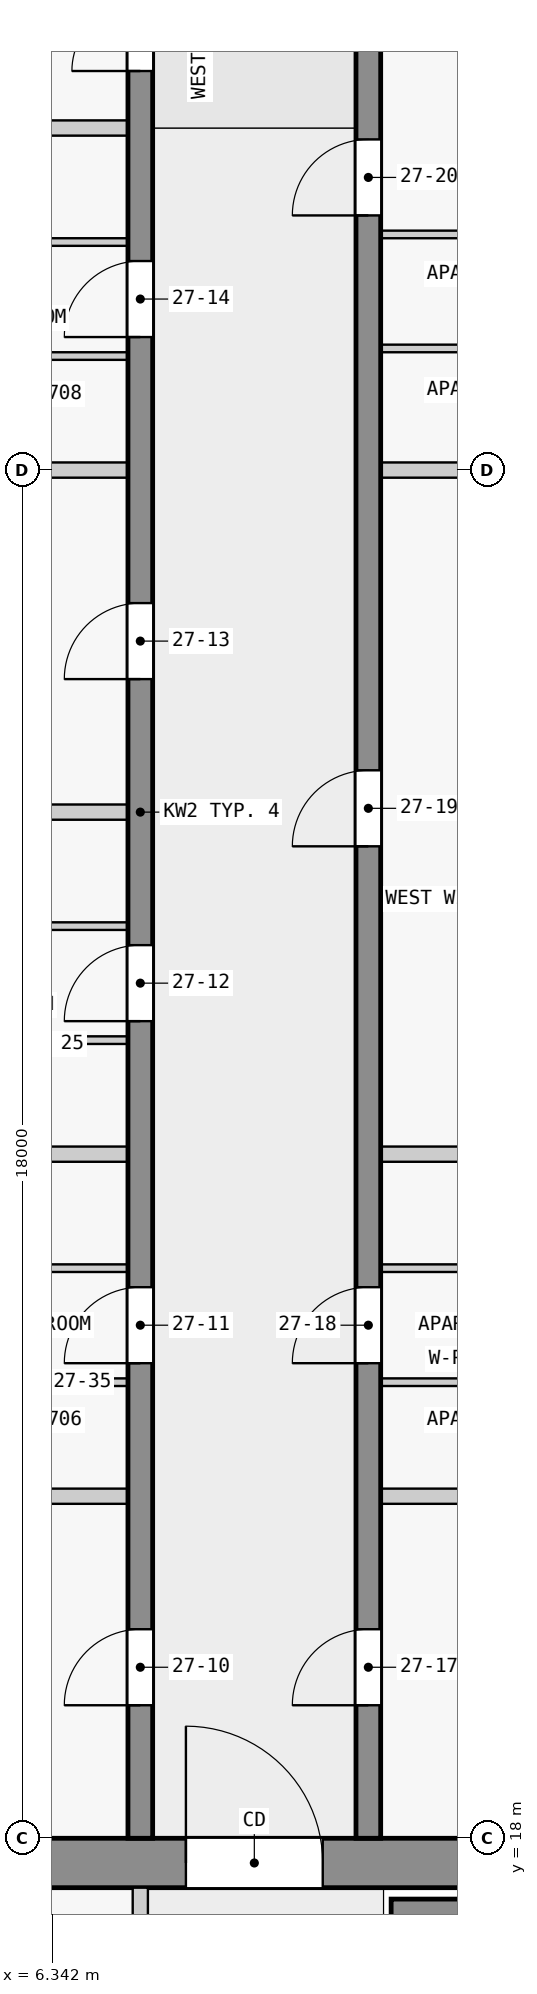
"""IFC4 building model, lengths in metres.
Left out: names, types, materials, properties, quantities, classifications, styles, units other than length and angle.
Written with IfcOpenShell. Run it as: python <this file> out.ifc"""

import sys

from ifc_helpers import new_model, si_unit, direction, frame, frame_2d, origin, place, context, subcontext, project, spatial, rectangle, extrude, element, fill, save


model = new_model("IFC4")
c1 = context("Model", 3, precision=1e-05, world=origin(), true_north=direction((0.0, 1.0)))
c2 = subcontext(c1, "Body", "Model", "MODEL_VIEW")
j1 = project(units=[si_unit("LENGTHUNIT", "METRE"), si_unit("PLANEANGLEUNIT", "RADIAN")], contexts=[c1])
p1 = place(None, origin())
s1 = spatial("IfcSite", under=j1, at=p1, CompositionType="ELEMENT")
p2 = place(p1, origin())
s2 = spatial("IfcBuilding", under=s1, at=p2, CompositionType="ELEMENT")
p3 = place(p2, frame((0.0, 0.0, 106.3)))
s3 = spatial("IfcBuildingStorey", under=s2, at=p3, CompositionType="ELEMENT", Elevation=106.3)
p4 = place(p3, frame((1.65, 17.675, 0.0), z_axis=(0.0, 0.0, 1.0), x_axis=(1.0, 0.0, 0.0)))
e1 = element("IfcWall", 1, at=p4, inside=s3, PredefinedType="SHEAR", context=c2, shape_type="SweptSolid", body=[
    extrude(rectangle(XDim=20.85, YDim=0.65, at=frame_2d((10.425, 0.0))), origin(), (0.0, 0.0, 1.0), 3.25),
])
p5 = place(p4, frame((6.45, 0.0, 0.0)))
e2 = element("IfcOpeningElement", 2, at=p5, cuts=e1, PredefinedType="OPENING", context=c2, shape_type="SweptSolid", body=[
    extrude(rectangle(XDim=1.8, YDim=2.1, at=frame_2d((0.9, 1.05))), frame((0.0, 0.335, 0.0), z_axis=(0.0, -1.0, 0.0), x_axis=(1.0, 0.0, 0.0)), (0.0, 0.0, 1.0), 0.67),
])
p6 = place(p3, frame((10.8, 17.05, 0.0), z_axis=(0.0, 0.0, 1.0), x_axis=(1.0, 0.0, 0.0)))
e3 = element("IfcWall", 3, at=p6, inside=s3, PredefinedType="SHEAR", context=c2, shape_type="SweptSolid", body=[
    extrude(rectangle(XDim=7.8, YDim=0.3, at=frame_2d((3.9, 0.0))), origin(), (0.0, 0.0, 1.0), 3.25),
])
p7 = place(p3, frame((7.5, 18.0, 0.0), z_axis=(0.0, 0.0, 1.0), x_axis=(0.0, 1.0, 0.0)))
e4 = element("IfcWall", 4, at=p7, inside=s3, PredefinedType="SHEAR", context=c2, shape_type="SweptSolid", body=[
    extrude(rectangle(XDim=27.0, YDim=0.325, at=frame_2d((13.5, 0.0))), origin(), (0.0, 0.0, 1.0), 3.25),
])
p8 = place(p7, frame((1.75, 0.0, 0.0)))
e5 = element("IfcOpeningElement", 5, at=p8, cuts=e4, PredefinedType="OPENING", context=c2, shape_type="SweptSolid", body=[
    extrude(rectangle(XDim=1.0, YDim=2.1, at=frame_2d((0.5, 1.05))), frame((0.0, 0.172, 0.0), z_axis=(0.0, -1.0, 0.0), x_axis=(1.0, 0.0, 0.0)), (0.0, 0.0, 1.0), 0.345),
])
p9 = place(p7, frame((6.25, 0.0, 0.0)))
e6 = element("IfcOpeningElement", 6, at=p9, cuts=e4, PredefinedType="OPENING", context=c2, shape_type="SweptSolid", body=[
    extrude(rectangle(XDim=1.0, YDim=2.1, at=frame_2d((0.5, 1.05))), frame((0.0, 0.172, 0.0), z_axis=(0.0, -1.0, 0.0), x_axis=(1.0, 0.0, 0.0)), (0.0, 0.0, 1.0), 0.345),
])
p10 = place(p7, frame((10.75, 0.0, 0.0)))
e7 = element("IfcOpeningElement", 7, at=p10, cuts=e4, PredefinedType="OPENING", context=c2, shape_type="SweptSolid", body=[
    extrude(rectangle(XDim=1.0, YDim=2.1, at=frame_2d((0.5, 1.05))), frame((0.0, 0.172, 0.0), z_axis=(0.0, -1.0, 0.0), x_axis=(1.0, 0.0, 0.0)), (0.0, 0.0, 1.0), 0.345),
])
p11 = place(p7, frame((15.25, 0.0, 0.0)))
e8 = element("IfcOpeningElement", 8, at=p11, cuts=e4, PredefinedType="OPENING", context=c2, shape_type="SweptSolid", body=[
    extrude(rectangle(XDim=1.0, YDim=2.1, at=frame_2d((0.5, 1.05))), frame((0.0, 0.172, 0.0), z_axis=(0.0, -1.0, 0.0), x_axis=(1.0, 0.0, 0.0)), (0.0, 0.0, 1.0), 0.345),
])
p12 = place(p7, frame((19.75, 0.0, 0.0)))
e9 = element("IfcOpeningElement", 9, at=p12, cuts=e4, PredefinedType="OPENING", context=c2, shape_type="SweptSolid", body=[
    extrude(rectangle(XDim=1.0, YDim=2.1, at=frame_2d((0.5, 1.05))), frame((0.0, 0.172, 0.0), z_axis=(0.0, -1.0, 0.0), x_axis=(1.0, 0.0, 0.0)), (0.0, 0.0, 1.0), 0.345),
])
p13 = place(p7, frame((23.25, 0.0, 0.0)))
e10 = element("IfcOpeningElement", 10, at=p13, cuts=e4, PredefinedType="OPENING", context=c2, shape_type="SweptSolid", body=[
    extrude(rectangle(XDim=0.9, YDim=2.1, at=frame_2d((0.45, 1.05))), frame((0.0, 0.172, 0.0), z_axis=(0.0, -1.0, 0.0), x_axis=(1.0, 0.0, 0.0)), (0.0, 0.0, 1.0), 0.345),
])
p14 = place(p7, frame((25.45, 0.0, 0.0)))
e11 = element("IfcOpeningElement", 11, at=p14, cuts=e4, PredefinedType="OPENING", context=c2, shape_type="SweptSolid", body=[
    extrude(rectangle(XDim=1.0, YDim=2.1, at=frame_2d((0.5, 1.05))), frame((0.0, 0.172, 0.0), z_axis=(0.0, -1.0, 0.0), x_axis=(1.0, 0.0, 0.0)), (0.0, 0.0, 1.0), 0.345),
])
p15 = place(p3, frame((10.5, 18.0, 0.0), z_axis=(0.0, 0.0, 1.0), x_axis=(0.0, 1.0, 0.0)))
e12 = element("IfcWall", 12, at=p15, inside=s3, PredefinedType="SHEAR", context=c2, shape_type="SweptSolid", body=[
    extrude(rectangle(XDim=27.0, YDim=0.325, at=frame_2d((13.5, 0.0))), origin(), (0.0, 0.0, 1.0), 3.25),
])
p16 = place(p15, frame((1.75, 0.0, 0.0)))
e13 = element("IfcOpeningElement", 13, at=p16, cuts=e12, PredefinedType="OPENING", context=c2, shape_type="SweptSolid", body=[
    extrude(rectangle(XDim=1.0, YDim=2.1, at=frame_2d((0.5, 1.05))), frame((0.0, 0.172, 0.0), z_axis=(0.0, -1.0, 0.0), x_axis=(1.0, 0.0, 0.0)), (0.0, 0.0, 1.0), 0.345),
])
p17 = place(p15, frame((6.25, 0.0, 0.0)))
e14 = element("IfcOpeningElement", 14, at=p17, cuts=e12, PredefinedType="OPENING", context=c2, shape_type="SweptSolid", body=[
    extrude(rectangle(XDim=1.0, YDim=2.1, at=frame_2d((0.5, 1.05))), frame((0.0, 0.172, 0.0), z_axis=(0.0, -1.0, 0.0), x_axis=(1.0, 0.0, 0.0)), (0.0, 0.0, 1.0), 0.345),
])
p18 = place(p15, frame((13.05, 0.0, 0.0)))
e15 = element("IfcOpeningElement", 15, at=p18, cuts=e12, PredefinedType="OPENING", context=c2, shape_type="SweptSolid", body=[
    extrude(rectangle(XDim=1.0, YDim=2.1, at=frame_2d((0.5, 1.05))), frame((0.0, 0.172, 0.0), z_axis=(0.0, -1.0, 0.0), x_axis=(1.0, 0.0, 0.0)), (0.0, 0.0, 1.0), 0.345),
])
p19 = place(p15, frame((21.35, 0.0, 0.0)))
e16 = element("IfcOpeningElement", 16, at=p19, cuts=e12, PredefinedType="OPENING", context=c2, shape_type="SweptSolid", body=[
    extrude(rectangle(XDim=1.0, YDim=2.1, at=frame_2d((0.5, 1.05))), frame((0.0, 0.172, 0.0), z_axis=(0.0, -1.0, 0.0), x_axis=(1.0, 0.0, 0.0)), (0.0, 0.0, 1.0), 0.345),
])
p20 = place(p3, frame((7.5, 10.1, 0.0), z_axis=(0.0, 0.0, 1.0), x_axis=(0.0, 1.0, 0.0)))
e17 = element("IfcWall", 17, at=p20, inside=s3, PredefinedType="PARTITIONING", context=c2, shape_type="SweptSolid", body=[
    extrude(rectangle(XDim=7.25, YDim=0.2, at=frame_2d((3.625, 0.0))), origin(), (0.0, 0.0, 1.0), 3.25),
])
p21 = place(p20, frame((0.775, 0.0, 0.0)))
e18 = element("IfcOpeningElement", 18, at=p21, cuts=e17, PredefinedType="OPENING", context=c2, shape_type="SweptSolid", body=[
    extrude(rectangle(XDim=0.9, YDim=2.1, at=frame_2d((0.45, 1.05))), frame((0.0, 0.11, 0.0), z_axis=(0.0, -1.0, 0.0), x_axis=(1.0, 0.0, 0.0)), (0.0, 0.0, 1.0), 0.22),
])
p22 = place(p20, frame((3.225, 0.0, 0.0)))
e19 = element("IfcOpeningElement", 19, at=p22, cuts=e17, PredefinedType="OPENING", context=c2, shape_type="SweptSolid", body=[
    extrude(rectangle(XDim=0.9, YDim=2.1, at=frame_2d((0.45, 1.05))), frame((0.0, 0.11, 0.0), z_axis=(0.0, -1.0, 0.0), x_axis=(1.0, 0.0, 0.0)), (0.0, 0.0, 1.0), 0.22),
])
p23 = place(p20, frame((5.25, 0.0, 0.0)))
e20 = element("IfcOpeningElement", 20, at=p23, cuts=e17, PredefinedType="OPENING", context=c2, shape_type="SweptSolid", body=[
    extrude(rectangle(XDim=0.9, YDim=2.1, at=frame_2d((0.45, 1.05))), frame((0.0, 0.11, 0.0), z_axis=(0.0, -1.0, 0.0), x_axis=(1.0, 0.0, 0.0)), (0.0, 0.0, 1.0), 0.22),
])
for number, where, z_axis, x_axis in (
    (21, (7.337, 22.5, 0.0), (0.0, 0.0, 1.0), (-1.0, 0.0, 0.0)),
    (22, (17.85, 22.5, 0.0), (0.0, 0.0, 1.0), (-1.0, 0.0, 0.0)),
):
    element("IfcWall", number, at=place(p3, frame(where, z_axis=z_axis, x_axis=x_axis)), inside=s3, PredefinedType="PARTITIONING", context=c2, shape_type="SweptSolid", body=[
        extrude(rectangle(XDim=7.188, YDim=0.2, at=frame_2d((3.594, 0.0))), origin(), (0.0, 0.0, 1.0), 3.25),
    ])
p24 = place(p3, frame((7.337, 24.0, 0.0), z_axis=(0.0, 0.0, 1.0), x_axis=(-1.0, 0.0, 0.0)))
e23 = element("IfcWall", 23, at=p24, inside=s3, PredefinedType="PARTITIONING", context=c2, shape_type="SweptSolid", body=[
    extrude(rectangle(XDim=3.4, YDim=0.1, at=frame_2d((1.7, 0.0))), origin(), (0.0, 0.0, 1.0), 3.25),
])
p25 = place(p24, frame((1.25, 0.0, 0.0)))
e24 = element("IfcOpeningElement", 24, at=p25, cuts=e23, PredefinedType="OPENING", context=c2, shape_type="SweptSolid", body=[
    extrude(rectangle(XDim=0.9, YDim=2.1, at=frame_2d((0.45, 1.05))), frame((0.0, 0.06, 0.0), z_axis=(0.0, -1.0, 0.0), x_axis=(1.0, 0.0, 0.0)), (0.0, 0.0, 1.0), 0.12),
])
p26 = place(p3, frame((14.062, 24.0, 0.0), z_axis=(0.0, 0.0, 1.0), x_axis=(-1.0, 0.0, 0.0)))
e25 = element("IfcWall", 25, at=p26, inside=s3, PredefinedType="PARTITIONING", context=c2, shape_type="SweptSolid", body=[
    extrude(rectangle(XDim=3.4, YDim=0.1, at=frame_2d((1.7, 0.0))), origin(), (0.0, 0.0, 1.0), 3.25),
])
p27 = place(p26, frame((1.25, 0.0, 0.0)))
e26 = element("IfcOpeningElement", 26, at=p27, cuts=e25, PredefinedType="OPENING", context=c2, shape_type="SweptSolid", body=[
    extrude(rectangle(XDim=0.9, YDim=2.1, at=frame_2d((0.45, 1.05))), frame((0.0, 0.06, 0.0), z_axis=(0.0, -1.0, 0.0), x_axis=(1.0, 0.0, 0.0)), (0.0, 0.0, 1.0), 0.12),
])
p28 = place(p3, frame((3.938, 25.5, 0.0), z_axis=(0.0, 0.0, 1.0), x_axis=(1.0, 0.0, 0.0)))
e27 = element("IfcWall", 27, at=p28, inside=s3, PredefinedType="PARTITIONING", context=c2, shape_type="SweptSolid", body=[
    extrude(rectangle(XDim=3.4, YDim=0.1, at=frame_2d((1.7, 0.0))), origin(), (0.0, 0.0, 1.0), 3.25),
])
p29 = place(p28, frame((1.25, 0.0, 0.0)))
e28 = element("IfcOpeningElement", 28, at=p29, cuts=e27, PredefinedType="OPENING", context=c2, shape_type="SweptSolid", body=[
    extrude(rectangle(XDim=0.9, YDim=2.1, at=frame_2d((0.45, 1.05))), frame((0.0, 0.06, 0.0), z_axis=(0.0, -1.0, 0.0), x_axis=(1.0, 0.0, 0.0)), (0.0, 0.0, 1.0), 0.12),
])
p30 = place(p3, frame((10.663, 25.5, 0.0), z_axis=(0.0, 0.0, 1.0), x_axis=(1.0, 0.0, 0.0)))
e29 = element("IfcWall", 29, at=p30, inside=s3, PredefinedType="PARTITIONING", context=c2, shape_type="SweptSolid", body=[
    extrude(rectangle(XDim=3.4, YDim=0.1, at=frame_2d((1.7, 0.0))), origin(), (0.0, 0.0, 1.0), 3.25),
])
p31 = place(p30, frame((1.25, 0.0, 0.0)))
e30 = element("IfcOpeningElement", 30, at=p31, cuts=e29, PredefinedType="OPENING", context=c2, shape_type="SweptSolid", body=[
    extrude(rectangle(XDim=0.9, YDim=2.1, at=frame_2d((0.45, 1.05))), frame((0.0, 0.06, 0.0), z_axis=(0.0, -1.0, 0.0), x_axis=(1.0, 0.0, 0.0)), (0.0, 0.0, 1.0), 0.12),
])
for number, where, z_axis, x_axis in (
    (31, (7.337, 27.0, 0.0), (0.0, 0.0, 1.0), (-1.0, 0.0, 0.0)),
    (32, (13.962, 27.0, 0.0), (0.0, 0.0, 1.0), (-1.0, 0.0, 0.0)),
):
    element("IfcWall", number, at=place(p3, frame(where, z_axis=z_axis, x_axis=x_axis)), inside=s3, PredefinedType="PARTITIONING", context=c2, shape_type="SweptSolid", body=[
        extrude(rectangle(XDim=3.3, YDim=0.2, at=frame_2d((1.65, 0.0))), origin(), (0.0, 0.0, 1.0), 3.25),
    ])
p32 = place(p3, frame((7.337, 28.5, 0.0), z_axis=(0.0, 0.0, 1.0), x_axis=(-1.0, 0.0, 0.0)))
e33 = element("IfcWall", 33, at=p32, inside=s3, PredefinedType="PARTITIONING", context=c2, shape_type="SweptSolid", body=[
    extrude(rectangle(XDim=3.4, YDim=0.1, at=frame_2d((1.7, 0.0))), origin(), (0.0, 0.0, 1.0), 3.25),
])
p33 = place(p32, frame((1.25, 0.0, 0.0)))
e34 = element("IfcOpeningElement", 34, at=p33, cuts=e33, PredefinedType="OPENING", context=c2, shape_type="SweptSolid", body=[
    extrude(rectangle(XDim=0.9, YDim=2.1, at=frame_2d((0.45, 1.05))), frame((0.0, 0.06, 0.0), z_axis=(0.0, -1.0, 0.0), x_axis=(1.0, 0.0, 0.0)), (0.0, 0.0, 1.0), 0.12),
])
p34 = place(p3, frame((3.938, 30.0, 0.0), z_axis=(0.0, 0.0, 1.0), x_axis=(1.0, 0.0, 0.0)))
e35 = element("IfcWall", 35, at=p34, inside=s3, PredefinedType="PARTITIONING", context=c2, shape_type="SweptSolid", body=[
    extrude(rectangle(XDim=3.4, YDim=0.1, at=frame_2d((1.7, 0.0))), origin(), (0.0, 0.0, 1.0), 3.25),
])
p35 = place(p34, frame((1.25, 0.0, 0.0)))
e36 = element("IfcOpeningElement", 36, at=p35, cuts=e35, PredefinedType="OPENING", context=c2, shape_type="SweptSolid", body=[
    extrude(rectangle(XDim=0.9, YDim=2.1, at=frame_2d((0.45, 1.05))), frame((0.0, 0.06, 0.0), z_axis=(0.0, -1.0, 0.0), x_axis=(1.0, 0.0, 0.0)), (0.0, 0.0, 1.0), 0.12),
])
p36 = place(p3, frame((7.337, 31.5, 0.0), z_axis=(0.0, 0.0, 1.0), x_axis=(-1.0, 0.0, 0.0)))
e37 = element("IfcWall", 37, at=p36, inside=s3, PredefinedType="PARTITIONING", context=c2, shape_type="SweptSolid", body=[
    extrude(rectangle(XDim=3.3, YDim=0.2, at=frame_2d((1.65, 0.0))), origin(), (0.0, 0.0, 1.0), 3.25),
])
for number, where, z_axis, x_axis in (
    (38, (7.337, 36.0, 0.0), (0.0, 0.0, 1.0), (-1.0, 0.0, 0.0)),
    (39, (16.6, 36.0, 0.0), (0.0, 0.0, 1.0), (-1.0, 0.0, 0.0)),
):
    element("IfcWall", number, at=place(p3, frame(where, z_axis=z_axis, x_axis=x_axis)), inside=s3, PredefinedType="PARTITIONING", context=c2, shape_type="SweptSolid", body=[
        extrude(rectangle(XDim=5.938, YDim=0.2, at=frame_2d((2.969, 0.0))), origin(), (0.0, 0.0, 1.0), 3.25),
    ])
p37 = place(p3, frame((7.337, 37.5, 0.0), z_axis=(0.0, 0.0, 1.0), x_axis=(-1.0, 0.0, 0.0)))
e40 = element("IfcWall", 40, at=p37, inside=s3, PredefinedType="PARTITIONING", context=c2, shape_type="SweptSolid", body=[
    extrude(rectangle(XDim=3.4, YDim=0.1, at=frame_2d((1.7, 0.0))), origin(), (0.0, 0.0, 1.0), 3.25),
])
p38 = place(p37, frame((1.25, 0.0, 0.0)))
e41 = element("IfcOpeningElement", 41, at=p38, cuts=e40, PredefinedType="OPENING", context=c2, shape_type="SweptSolid", body=[
    extrude(rectangle(XDim=0.9, YDim=2.1, at=frame_2d((0.45, 1.05))), frame((0.0, 0.06, 0.0), z_axis=(0.0, -1.0, 0.0), x_axis=(1.0, 0.0, 0.0)), (0.0, 0.0, 1.0), 0.12),
])
p39 = place(p3, frame((14.062, 37.6, 0.0), z_axis=(0.0, 0.0, 1.0), x_axis=(-1.0, 0.0, 0.0)))
e42 = element("IfcWall", 42, at=p39, inside=s3, PredefinedType="PARTITIONING", context=c2, shape_type="SweptSolid", body=[
    extrude(rectangle(XDim=3.4, YDim=0.1, at=frame_2d((1.7, 0.0))), origin(), (0.0, 0.0, 1.0), 3.25),
])
p40 = place(p3, frame((3.938, 39.0, 0.0), z_axis=(0.0, 0.0, 1.0), x_axis=(1.0, 0.0, 0.0)))
e43 = element("IfcWall", 43, at=p40, inside=s3, PredefinedType="PARTITIONING", context=c2, shape_type="SweptSolid", body=[
    extrude(rectangle(XDim=3.4, YDim=0.1, at=frame_2d((1.7, 0.0))), origin(), (0.0, 0.0, 1.0), 3.25),
])
p41 = place(p40, frame((1.25, 0.0, 0.0)))
e44 = element("IfcOpeningElement", 44, at=p41, cuts=e43, PredefinedType="OPENING", context=c2, shape_type="SweptSolid", body=[
    extrude(rectangle(XDim=0.9, YDim=2.1, at=frame_2d((0.45, 1.05))), frame((0.0, 0.06, 0.0), z_axis=(0.0, -1.0, 0.0), x_axis=(1.0, 0.0, 0.0)), (0.0, 0.0, 1.0), 0.12),
])
p42 = place(p3, frame((14.062, 39.1, 0.0), z_axis=(0.0, 0.0, 1.0), x_axis=(-1.0, 0.0, 0.0)))
e45 = element("IfcWall", 45, at=p42, inside=s3, PredefinedType="PARTITIONING", context=c2, shape_type="SweptSolid", body=[
    extrude(rectangle(XDim=3.4, YDim=0.1, at=frame_2d((1.7, 0.0))), origin(), (0.0, 0.0, 1.0), 3.25),
])
p43 = place(p42, frame((1.25, 0.0, 0.0)))
e46 = element("IfcOpeningElement", 46, at=p43, cuts=e45, PredefinedType="OPENING", context=c2, shape_type="SweptSolid", body=[
    extrude(rectangle(XDim=0.9, YDim=2.1, at=frame_2d((0.45, 1.05))), frame((0.0, 0.06, 0.0), z_axis=(0.0, -1.0, 0.0), x_axis=(1.0, 0.0, 0.0)), (0.0, 0.0, 1.0), 0.12),
])
p44 = place(p3, frame((7.337, 40.5, 0.0), z_axis=(0.0, 0.0, 1.0), x_axis=(-1.0, 0.0, 0.0)))
e47 = element("IfcWall", 47, at=p44, inside=s3, PredefinedType="PARTITIONING", context=c2, shape_type="SweptSolid", body=[
    extrude(rectangle(XDim=3.3, YDim=0.2, at=frame_2d((1.65, 0.0))), origin(), (0.0, 0.0, 1.0), 3.25),
])
p45 = place(p5, origin())
e48 = element("IfcDoor", 48, at=p45, inside=s3, OperationType="DOUBLE_DOOR_SINGLE_SWING", PredefinedType="DOOR", context=c2, shape_type="SweptSolid", body=[
    extrude(rectangle(XDim=1.8, YDim=2.1, at=frame_2d((0.9, 1.05))), frame((0.0, 0.025, 0.0), z_axis=(0.0, -1.0, 0.0), x_axis=(1.0, 0.0, 0.0)), (0.0, 0.0, 1.0), 0.05),
])
fill(e2, e48)
p46 = place(p8, origin())
e49 = element("IfcDoor", 49, at=p46, inside=s3, OperationType="SINGLE_SWING_LEFT", PredefinedType="DOOR", context=c2, shape_type="SweptSolid", body=[
    extrude(rectangle(XDim=1.0, YDim=2.1, at=frame_2d((0.5, 1.05))), frame((0.0, 0.025, 0.0), z_axis=(0.0, -1.0, 0.0), x_axis=(1.0, 0.0, 0.0)), (0.0, 0.0, 1.0), 0.05),
])
fill(e5, e49)
p47 = place(p9, origin())
e50 = element("IfcDoor", 50, at=p47, inside=s3, OperationType="SINGLE_SWING_LEFT", PredefinedType="DOOR", context=c2, shape_type="SweptSolid", body=[
    extrude(rectangle(XDim=1.0, YDim=2.1, at=frame_2d((0.5, 1.05))), frame((0.0, 0.025, 0.0), z_axis=(0.0, -1.0, 0.0), x_axis=(1.0, 0.0, 0.0)), (0.0, 0.0, 1.0), 0.05),
])
fill(e6, e50)
p48 = place(p10, origin())
e51 = element("IfcDoor", 51, at=p48, inside=s3, OperationType="SINGLE_SWING_LEFT", PredefinedType="DOOR", context=c2, shape_type="SweptSolid", body=[
    extrude(rectangle(XDim=1.0, YDim=2.1, at=frame_2d((0.5, 1.05))), frame((0.0, 0.025, 0.0), z_axis=(0.0, -1.0, 0.0), x_axis=(1.0, 0.0, 0.0)), (0.0, 0.0, 1.0), 0.05),
])
fill(e7, e51)
p49 = place(p11, origin())
e52 = element("IfcDoor", 52, at=p49, inside=s3, OperationType="SINGLE_SWING_RIGHT", PredefinedType="DOOR", context=c2, shape_type="SweptSolid", body=[
    extrude(rectangle(XDim=1.0, YDim=2.1, at=frame_2d((0.5, 1.05))), frame((0.0, 0.025, 0.0), z_axis=(0.0, -1.0, 0.0), x_axis=(1.0, 0.0, 0.0)), (0.0, 0.0, 1.0), 0.05),
])
fill(e8, e52)
p50 = place(p12, origin())
e53 = element("IfcDoor", 53, at=p50, inside=s3, OperationType="SINGLE_SWING_RIGHT", PredefinedType="DOOR", context=c2, shape_type="SweptSolid", body=[
    extrude(rectangle(XDim=1.0, YDim=2.1, at=frame_2d((0.5, 1.05))), frame((0.0, 0.025, 0.0), z_axis=(0.0, -1.0, 0.0), x_axis=(1.0, 0.0, 0.0)), (0.0, 0.0, 1.0), 0.05),
])
fill(e9, e53)
p51 = place(p13, origin())
e54 = element("IfcDoor", 54, at=p51, inside=s3, OperationType="SINGLE_SWING_RIGHT", PredefinedType="DOOR", context=c2, shape_type="SweptSolid", body=[
    extrude(rectangle(XDim=0.9, YDim=2.1, at=frame_2d((0.45, 1.05))), frame((0.0, 0.025, 0.0), z_axis=(0.0, -1.0, 0.0), x_axis=(1.0, 0.0, 0.0)), (0.0, 0.0, 1.0), 0.05),
])
fill(e10, e54)
p52 = place(p16, origin())
e55 = element("IfcDoor", 55, at=p52, inside=s3, OperationType="SINGLE_SWING_LEFT", PredefinedType="DOOR", context=c2, shape_type="SweptSolid", body=[
    extrude(rectangle(XDim=1.0, YDim=2.1, at=frame_2d((0.5, 1.05))), frame((0.0, 0.025, 0.0), z_axis=(0.0, -1.0, 0.0), x_axis=(1.0, 0.0, 0.0)), (0.0, 0.0, 1.0), 0.05),
])
fill(e13, e55)
p53 = place(p17, origin())
e56 = element("IfcDoor", 56, at=p53, inside=s3, OperationType="SINGLE_SWING_LEFT", PredefinedType="DOOR", context=c2, shape_type="SweptSolid", body=[
    extrude(rectangle(XDim=1.0, YDim=2.1, at=frame_2d((0.5, 1.05))), frame((0.0, 0.025, 0.0), z_axis=(0.0, -1.0, 0.0), x_axis=(1.0, 0.0, 0.0)), (0.0, 0.0, 1.0), 0.05),
])
fill(e14, e56)
p54 = place(p18, origin())
e57 = element("IfcDoor", 57, at=p54, inside=s3, OperationType="SINGLE_SWING_RIGHT", PredefinedType="DOOR", context=c2, shape_type="SweptSolid", body=[
    extrude(rectangle(XDim=1.0, YDim=2.1, at=frame_2d((0.5, 1.05))), frame((0.0, 0.025, 0.0), z_axis=(0.0, -1.0, 0.0), x_axis=(1.0, 0.0, 0.0)), (0.0, 0.0, 1.0), 0.05),
])
fill(e15, e57)
p55 = place(p19, origin())
e58 = element("IfcDoor", 58, at=p55, inside=s3, OperationType="SINGLE_SWING_RIGHT", PredefinedType="DOOR", context=c2, shape_type="SweptSolid", body=[
    extrude(rectangle(XDim=1.0, YDim=2.1, at=frame_2d((0.5, 1.05))), frame((0.0, 0.025, 0.0), z_axis=(0.0, -1.0, 0.0), x_axis=(1.0, 0.0, 0.0)), (0.0, 0.0, 1.0), 0.05),
])
fill(e16, e58)
save(model, sys.argv[1])
